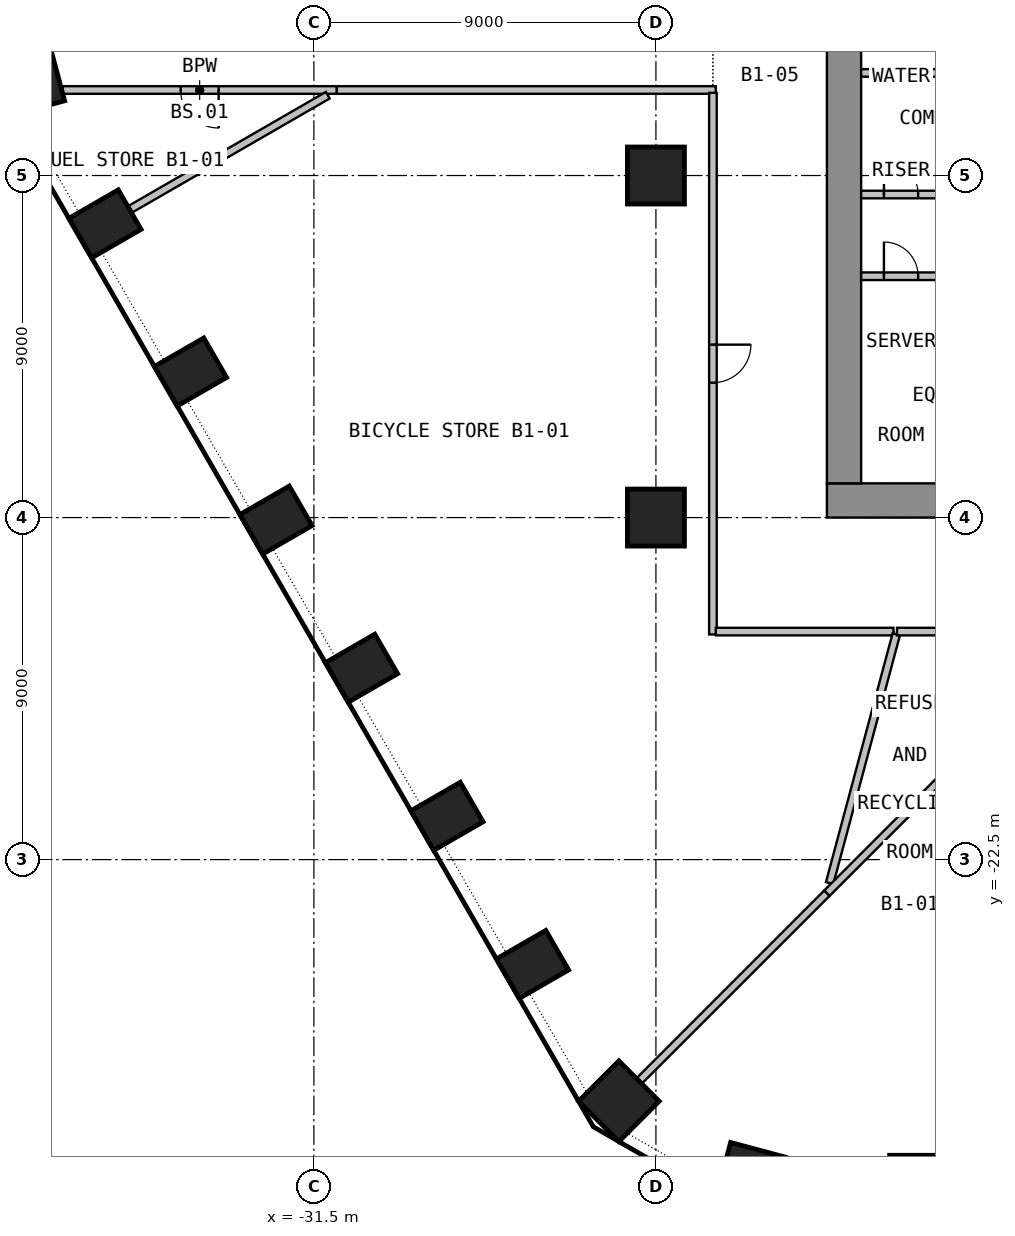
"""IFC4 building model, lengths in metres.
Left out: names, types, materials, properties, quantities, classifications, styles, units other than length and angle.
Written with IfcOpenShell. Run it as: python <this file> out.ifc"""

import sys

from ifc_helpers import new_model, si_unit, direction, frame, frame_2d, origin, origin_2d, place, context, subcontext, project, spatial, rectangle, circle, extrude, element, fill, save


model = new_model("IFC4")
c1 = context("Model", 3, precision=1e-05, world=origin(), true_north=direction((0.0, 1.0)))
c2 = subcontext(c1, "Body", "Model", "MODEL_VIEW")
j1 = project(units=[si_unit("LENGTHUNIT", "METRE"), si_unit("PLANEANGLEUNIT", "RADIAN")], contexts=[c1])
p1 = place(None, origin())
s1 = spatial("IfcSite", under=j1, at=p1, CompositionType="ELEMENT")
p2 = place(p1, origin())
s2 = spatial("IfcBuilding", under=s1, at=p2, CompositionType="ELEMENT")
p3 = place(p2, frame((0.0, 0.0, -5.0)))
s3 = spatial("IfcBuildingStorey", under=s2, at=p3, CompositionType="ELEMENT", Elevation=-5.0)
p4 = place(p3, frame((-20.004, -30.861, 0.0), z_axis=(0.0, 0.0, 1.0), x_axis=(0.965925826289, -0.258819045103, 0.0)))
e1 = element("IfcColumn", 1, at=p4, inside=s3, PredefinedType="COLUMN", context=c2, shape_type="SweptSolid", body=[
    extrude(rectangle(XDim=1.5, YDim=1.5, at=origin_2d()), origin(), (0.0, 0.0, 1.0), 4.55),
])
p5 = place(p3, frame((-15.75, -31.03, 0.0), z_axis=(0.0, 0.0, 1.0), x_axis=(1.0, 0.0, 0.0)))
e2 = element("IfcColumn", 2, at=p5, inside=s3, PredefinedType="COLUMN", context=c2, shape_type="SweptSolid", body=[
    extrude(rectangle(XDim=1.2, YDim=1.5, at=origin_2d()), origin(), (0.0, 0.0, 1.0), 4.55),
])
p6 = place(p3, frame((-38.979, -2.004, 0.0), z_axis=(0.0, 0.0, 1.0), x_axis=(0.258819045103, -0.965925826289, 0.0)))
e3 = element("IfcColumn", 3, at=p6, inside=s3, PredefinedType="COLUMN", context=c2, shape_type="SweptSolid", body=[
    extrude(rectangle(XDim=1.5, YDim=1.5, at=origin_2d()), origin(), (0.0, 0.0, 1.0), 4.55),
])
for number, where, z_axis, x_axis in (
    (4, (-36.998, -5.772, 0.0), (0.0, 0.0, 1.0), (0.5, -0.866, 0.0)),
    (5, (-34.748, -9.669, 0.0), (0.0, 0.0, 1.0), (0.5, -0.866, 0.0)),
    (6, (-32.498, -13.566, 0.0), (0.0, 0.0, 1.0), (0.5, -0.866, 0.0)),
    (7, (-30.248, -17.463, 0.0), (0.0, 0.0, 1.0), (0.5, -0.866, 0.0)),
    (8, (-27.998, -21.361, 0.0), (0.0, 0.0, 1.0), (0.5, -0.866, 0.0)),
    (9, (-25.748, -25.258, 0.0), (0.0, 0.0, 1.0), (0.5, -0.866, 0.0)),
):
    element("IfcColumn", number, at=place(p3, frame(where, z_axis=z_axis, x_axis=x_axis)), inside=s3, PredefinedType="COLUMN", context=c2, shape_type="SweptSolid", body=[
        extrude(rectangle(XDim=1.2, YDim=1.5, at=origin_2d()), origin(), (0.0, 0.0, 1.0), 4.55),
    ])
p7 = place(p3, frame((-23.475, -28.857, 0.0), z_axis=(0.0, 0.0, 1.0), x_axis=(0.707106781187, -0.707106781187, 0.0)))
e10 = element("IfcColumn", 10, at=p7, inside=s3, PredefinedType="COLUMN", context=c2, shape_type="SweptSolid", body=[
    extrude(rectangle(XDim=1.5, YDim=1.5, at=origin_2d()), origin(), (0.0, 0.0, 1.0), 4.55),
])
for number, where, z_axis, x_axis in (
    (11, (-22.5, -13.5, 0.0), (0.0, 0.0, 1.0), (1.0, 0.0, 0.0)),
    (12, (-22.5, -4.5, 0.0), (0.0, 0.0, 1.0), (1.0, 0.0, 0.0)),
):
    element("IfcColumn", number, at=place(p3, frame(where, z_axis=z_axis, x_axis=x_axis)), inside=s3, PredefinedType="COLUMN", context=c2, shape_type="SweptSolid", body=[
        extrude(circle(Radius=0.75, at=origin_2d()), origin(), (0.0, 0.0, 1.0), 4.55),
    ])
p8 = place(p3, frame((-18.0, -13.05, 0.0), z_axis=(0.0, 0.0, 1.0), x_axis=(1.0, 0.0, 0.0)))
e13 = element("IfcWall", 13, at=p8, inside=s3, PredefinedType="SHEAR", context=c2, shape_type="SweptSolid", body=[
    extrude(rectangle(XDim=36.0, YDim=0.9, at=frame_2d((18.0, 0.0))), origin(), (0.0, 0.0, 1.0), 4.55),
])
p9 = place(p8, frame((16.8, 0.0, 0.0)))
e14 = element("IfcOpeningElement", 14, at=p9, cuts=e13, PredefinedType="OPENING", context=c2, shape_type="SweptSolid", body=[
    extrude(rectangle(XDim=2.4, YDim=2.1, at=frame_2d((1.2, 1.05))), frame((0.0, 0.46, 0.0), z_axis=(0.0, -1.0, 0.0), x_axis=(1.0, 0.0, 0.0)), (0.0, 0.0, 1.0), 0.92),
])
p10 = place(p8, frame((5.55, 0.0, 0.0)))
e15 = element("IfcOpeningElement", 15, at=p10, cuts=e13, PredefinedType="OPENING", context=c2, shape_type="SweptSolid", body=[
    extrude(rectangle(XDim=1.2, YDim=2.1, at=frame_2d((0.6, 1.05))), frame((0.0, 0.46, 0.0), z_axis=(0.0, -1.0, 0.0), x_axis=(1.0, 0.0, 0.0)), (0.0, 0.0, 1.0), 0.92),
])
p11 = place(p8, frame((29.25, 0.0, 0.0)))
e16 = element("IfcOpeningElement", 16, at=p11, cuts=e13, PredefinedType="OPENING", context=c2, shape_type="SweptSolid", body=[
    extrude(rectangle(XDim=1.2, YDim=2.1, at=frame_2d((0.6, 1.05))), frame((0.0, 0.46, 0.0), z_axis=(0.0, -1.0, 0.0), x_axis=(1.0, 0.0, 0.0)), (0.0, 0.0, 1.0), 0.92),
])
p12 = place(p3, frame((-17.55, -12.6, 0.0), z_axis=(0.0, 0.0, 1.0), x_axis=(0.0, 1.0, 0.0)))
e17 = element("IfcWall", 17, at=p12, inside=s3, PredefinedType="SHEAR", context=c2, shape_type="SweptSolid", body=[
    extrude(rectangle(XDim=25.2, YDim=0.9, at=frame_2d((12.6, 0.0))), origin(), (0.0, 0.0, 1.0), 4.55),
])
p13 = place(p12, frame((11.4, 0.0, 0.0)))
e18 = element("IfcOpeningElement", 18, at=p13, cuts=e17, PredefinedType="OPENING", context=c2, shape_type="SweptSolid", body=[
    extrude(rectangle(XDim=2.4, YDim=2.1, at=frame_2d((1.2, 1.05))), frame((0.0, 0.46, 0.0), z_axis=(0.0, -1.0, 0.0), x_axis=(1.0, 0.0, 0.0)), (0.0, 0.0, 1.0), 0.92),
])
p14 = place(p3, frame((-17.1, -7.15, 0.0), z_axis=(0.0, 0.0, 1.0), x_axis=(1.0, 0.0, 0.0)))
e19 = element("IfcWall", 19, at=p14, inside=s3, PredefinedType="PARTITIONING", context=c2, shape_type="SweptSolid", body=[
    extrude(rectangle(XDim=4.2, YDim=0.2, at=frame_2d((2.1, 0.0))), origin(), (0.0, 0.0, 1.0), 4.55),
])
p15 = place(p14, frame((0.6, 0.0, 0.0)))
e20 = element("IfcOpeningElement", 20, at=p15, cuts=e19, PredefinedType="OPENING", context=c2, shape_type="SweptSolid", body=[
    extrude(rectangle(XDim=0.9, YDim=2.1, at=frame_2d((0.45, 1.05))), frame((0.0, 0.11, 0.0), z_axis=(0.0, -1.0, 0.0), x_axis=(1.0, 0.0, 0.0)), (0.0, 0.0, 1.0), 0.22),
])
p16 = place(p14, frame((2.7, 0.0, 0.0)))
e21 = element("IfcOpeningElement", 21, at=p16, cuts=e19, PredefinedType="OPENING", context=c2, shape_type="SweptSolid", body=[
    extrude(rectangle(XDim=0.9, YDim=2.1, at=frame_2d((0.45, 1.05))), frame((0.0, 0.11, 0.0), z_axis=(0.0, -1.0, 0.0), x_axis=(1.0, 0.0, 0.0)), (0.0, 0.0, 1.0), 0.22),
])
p17 = place(p3, frame((-17.1, -5.0, 0.0), z_axis=(0.0, 0.0, 1.0), x_axis=(1.0, 0.0, 0.0)))
e22 = element("IfcWall", 22, at=p17, inside=s3, PredefinedType="PARTITIONING", context=c2, shape_type="SweptSolid", body=[
    extrude(rectangle(XDim=4.2, YDim=0.2, at=frame_2d((2.1, 0.0))), origin(), (0.0, 0.0, 1.0), 4.55),
])
p18 = place(p17, frame((0.6, 0.0, 0.0)))
e23 = element("IfcOpeningElement", 23, at=p18, cuts=e22, PredefinedType="OPENING", context=c2, shape_type="SweptSolid", body=[
    extrude(rectangle(XDim=0.9, YDim=2.1, at=frame_2d((0.45, 1.05))), frame((0.0, 0.11, 0.0), z_axis=(0.0, -1.0, 0.0), x_axis=(1.0, 0.0, 0.0)), (0.0, 0.0, 1.0), 0.22),
])
p19 = place(p17, frame((2.7, 0.0, 0.0)))
e24 = element("IfcOpeningElement", 24, at=p19, cuts=e22, PredefinedType="OPENING", context=c2, shape_type="SweptSolid", body=[
    extrude(rectangle(XDim=0.9, YDim=2.1, at=frame_2d((0.45, 1.05))), frame((0.0, 0.11, 0.0), z_axis=(0.0, -1.0, 0.0), x_axis=(1.0, 0.0, 0.0)), (0.0, 0.0, 1.0), 0.22),
])
p20 = place(p3, frame((-17.1, -1.8, 0.0), z_axis=(0.0, 0.0, 1.0), x_axis=(1.0, 0.0, 0.0)))
e25 = element("IfcWall", 25, at=p20, inside=s3, PredefinedType="PARTITIONING", context=c2, shape_type="SweptSolid", body=[
    extrude(rectangle(XDim=4.2, YDim=0.2, at=frame_2d((2.1, 0.0))), origin(), (0.0, 0.0, 1.0), 4.55),
])
p21 = place(p3, frame((-30.897, -2.25, 0.0), z_axis=(0.0, 0.0, 1.0), x_axis=(-1.0, 0.0, 0.0)))
e26 = element("IfcWall", 26, at=p21, inside=s3, PredefinedType="PARTITIONING", context=c2, shape_type="SweptSolid", body=[
    extrude(rectangle(XDim=7.219, YDim=0.2, at=frame_2d((3.609, 0.0))), origin(), (0.0, 0.0, 1.0), 4.55),
])
p22 = place(p21, frame((3.109, 0.0, 0.0)))
e27 = element("IfcOpeningElement", 27, at=p22, cuts=e26, PredefinedType="OPENING", context=c2, shape_type="SweptSolid", body=[
    extrude(rectangle(XDim=1.0, YDim=2.1, at=frame_2d((0.5, 1.05))), frame((0.0, 0.11, 0.0), z_axis=(0.0, -1.0, 0.0), x_axis=(1.0, 0.0, 0.0)), (0.0, 0.0, 1.0), 0.22),
])
p23 = place(p3, frame((-31.135, -2.387, 0.0), z_axis=(0.0, 0.0, 1.0), x_axis=(-0.866018198007, -0.500012480565, 0.0)))
e28 = element("IfcWall", 28, at=p23, inside=s3, PredefinedType="PARTITIONING", context=c2, shape_type="SweptSolid", body=[
    extrude(rectangle(XDim=5.999, YDim=0.2, at=frame_2d((3.0, 0.0))), origin(), (0.0, 0.0, 1.0), 4.55),
])
p24 = place(p3, frame((-20.925, -2.25, 0.0), z_axis=(0.0, 0.0, 1.0), x_axis=(-1.0, 0.0, 0.0)))
e29 = element("IfcWall", 29, at=p24, inside=s3, PredefinedType="PARTITIONING", context=c2, shape_type="SweptSolid", body=[
    extrude(rectangle(XDim=9.972, YDim=0.2, at=frame_2d((4.986, 0.0))), origin(), (0.0, 0.0, 1.0), 4.55),
])
p25 = place(p3, frame((-18.0, -23.383, 0.0), z_axis=(0.0, 0.0, 1.0), x_axis=(-0.707124289247, -0.707089272693, 0.0)))
e30 = element("IfcWall", 30, at=p25, inside=s3, PredefinedType="PARTITIONING", context=c2, shape_type="SweptSolid", body=[
    extrude(rectangle(XDim=6.972, YDim=0.2, at=frame_2d((3.486, 0.0))), origin(), (0.0, 0.0, 1.0), 4.55),
])
p26 = place(p3, frame((-21.0, -2.325, 0.0), z_axis=(0.0, 0.0, 1.0), x_axis=(0.0, -1.0, 0.0)))
e31 = element("IfcWall", 31, at=p26, inside=s3, PredefinedType="PARTITIONING", context=c2, shape_type="SweptSolid", body=[
    extrude(rectangle(XDim=14.25, YDim=0.2, at=frame_2d((7.125, 0.0))), origin(), (0.0, 0.0, 1.0), 4.55),
])
p27 = place(p26, frame((6.625, 0.0, 0.0)))
e32 = element("IfcOpeningElement", 32, at=p27, cuts=e31, PredefinedType="OPENING", context=c2, shape_type="SweptSolid", body=[
    extrude(rectangle(XDim=1.0, YDim=2.1, at=frame_2d((0.5, 1.05))), frame((0.0, 0.11, 0.0), z_axis=(0.0, -1.0, 0.0), x_axis=(1.0, 0.0, 0.0)), (0.0, 0.0, 1.0), 0.22),
])
p28 = place(p3, frame((-20.925, -16.5, 0.0), z_axis=(0.0, 0.0, 1.0), x_axis=(1.0, 0.0, 0.0)))
e33 = element("IfcWall", 33, at=p28, inside=s3, PredefinedType="PARTITIONING", context=c2, shape_type="SweptSolid", body=[
    extrude(rectangle(XDim=4.674, YDim=0.2, at=frame_2d((2.337, 0.0))), origin(), (0.0, 0.0, 1.0), 4.55),
])
p29 = place(p3, frame((-16.175, -16.573, 0.0), z_axis=(0.0, 0.0, 1.0), x_axis=(-0.25877931008, -0.96593647238, 0.0)))
e34 = element("IfcWall", 34, at=p29, inside=s3, PredefinedType="PARTITIONING", context=c2, shape_type="SweptSolid", body=[
    extrude(rectangle(XDim=6.776, YDim=0.2, at=frame_2d((3.388, 0.0))), origin(), (0.0, 0.0, 1.0), 4.55),
])
p30 = place(p3, frame((-11.17, -16.553, 0.0), z_axis=(0.0, 0.0, 1.0), x_axis=(-0.707106781187, -0.707106781187, 0.0)))
e35 = element("IfcWall", 35, at=p30, inside=s3, PredefinedType="PARTITIONING", context=c2, shape_type="SweptSolid", body=[
    extrude(rectangle(XDim=9.659, YDim=0.2, at=frame_2d((4.83, 0.0))), origin(), (0.0, 0.0, 1.0), 4.55),
])
p31 = place(p3, frame((-16.156, -16.5, 0.0), z_axis=(0.0, 0.0, 1.0), x_axis=(1.0, 0.0, 0.0)))
e36 = element("IfcWall", 36, at=p31, inside=s3, PredefinedType="PARTITIONING", context=c2, shape_type="SweptSolid", body=[
    extrude(rectangle(XDim=4.864, YDim=0.2, at=frame_2d((2.432, 0.0))), origin(), (0.0, 0.0, 1.0), 4.55),
])
p32 = place(p31, frame((1.932, 0.0, 0.0)))
e37 = element("IfcOpeningElement", 37, at=p32, cuts=e36, PredefinedType="OPENING", context=c2, shape_type="SweptSolid", body=[
    extrude(rectangle(XDim=1.0, YDim=2.1, at=frame_2d((0.5, 1.05))), frame((0.0, 0.11, 0.0), z_axis=(0.0, -1.0, 0.0), x_axis=(1.0, 0.0, 0.0)), (0.0, 0.0, 1.0), 0.22),
])
p33 = place(p15, origin())
e38 = element("IfcDoor", 38, at=p33, inside=s3, OperationType="SINGLE_SWING_LEFT", PredefinedType="DOOR", context=c2, shape_type="SweptSolid", body=[
    extrude(rectangle(XDim=0.9, YDim=2.1, at=frame_2d((0.45, 1.05))), frame((0.0, 0.025, 0.0), z_axis=(0.0, -1.0, 0.0), x_axis=(1.0, 0.0, 0.0)), (0.0, 0.0, 1.0), 0.05),
])
fill(e20, e38)
p34 = place(p18, origin())
e39 = element("IfcDoor", 39, at=p34, inside=s3, OperationType="SINGLE_SWING_LEFT", PredefinedType="DOOR", context=c2, shape_type="SweptSolid", body=[
    extrude(rectangle(XDim=0.9, YDim=2.1, at=frame_2d((0.45, 1.05))), frame((0.0, 0.025, 0.0), z_axis=(0.0, -1.0, 0.0), x_axis=(1.0, 0.0, 0.0)), (0.0, 0.0, 1.0), 0.05),
])
fill(e23, e39)
p35 = place(p22, origin())
e40 = element("IfcDoor", 40, at=p35, inside=s3, OperationType="SINGLE_SWING_RIGHT", PredefinedType="DOOR", context=c2, shape_type="SweptSolid", body=[
    extrude(rectangle(XDim=1.0, YDim=2.1, at=frame_2d((0.5, 1.05))), frame((0.0, 0.025, 0.0), z_axis=(0.0, -1.0, 0.0), x_axis=(1.0, 0.0, 0.0)), (0.0, 0.0, 1.0), 0.05),
])
fill(e27, e40)
p36 = place(p27, origin())
e41 = element("IfcDoor", 41, at=p36, inside=s3, OperationType="SINGLE_SWING_RIGHT", PredefinedType="DOOR", context=c2, shape_type="SweptSolid", body=[
    extrude(rectangle(XDim=1.0, YDim=2.1, at=frame_2d((0.5, 1.05))), frame((0.0, 0.025, 0.0), z_axis=(0.0, -1.0, 0.0), x_axis=(1.0, 0.0, 0.0)), (0.0, 0.0, 1.0), 0.05),
])
fill(e32, e41)
save(model, sys.argv[1])
